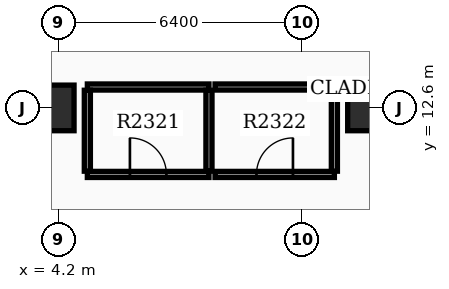
"""IFC4 building model, lengths in metres.
Left out: names, types, materials, properties, quantities, classifications, styles, units other than length and angle.
Written with IfcOpenShell. Run it as: python <this file> out.ifc"""

import sys

from ifc_helpers import new_model, si_unit, direction, frame, frame_2d, origin, origin_2d, place, context, subcontext, project, spatial, rectangle, extrude, element, fill, save


model = new_model("IFC4")
c1 = context("Model", 3, precision=1e-05, world=origin(), true_north=direction((0.0, 1.0)))
c2 = subcontext(c1, "Body", "Model", "MODEL_VIEW")
j1 = project(units=[si_unit("LENGTHUNIT", "METRE"), si_unit("PLANEANGLEUNIT", "RADIAN")], contexts=[c1])
p1 = place(None, origin())
s1 = spatial("IfcSite", under=j1, at=p1, CompositionType="ELEMENT")
p2 = place(p1, origin())
s2 = spatial("IfcBuilding", under=s1, at=p2, CompositionType="ELEMENT")
p3 = place(p2, frame((0.0, 0.0, 148.8)))
s3 = spatial("IfcBuildingStorey", under=s2, at=p3, CompositionType="ELEMENT", Elevation=148.8)
for number, where, z_axis, x_axis in (
    (1, (12.4, 12.6, 0.0), (0.0, 0.0, 1.0), (1.0, 0.0, 0.0)),
    (2, (4.0, 12.6, 0.0), (0.0, 0.0, 1.0), (1.0, 0.0, 0.0)),
):
    element("IfcColumn", number, at=place(p3, frame(where, z_axis=z_axis, x_axis=x_axis)), inside=s3, PredefinedType="COLUMN", context=c2, shape_type="SweptSolid", body=[
        extrude(rectangle(XDim=1.2, YDim=1.2, at=origin_2d()), origin(), (0.0, 0.0, 1.0), 3.9),
    ])
p4 = place(p3, frame((4.95, 10.85, 0.0), z_axis=(0.0, 0.0, 1.0), x_axis=(1.0, 0.0, 0.0)))
e3 = element("IfcWall", 3, at=p4, inside=s3, PredefinedType="PARTITIONING", context=c2, shape_type="SweptSolid", body=[
    extrude(rectangle(XDim=3.2, YDim=0.16, at=frame_2d((1.6, 0.0))), origin(), (0.0, 0.0, 1.0), 2.96),
])
p5 = place(p4, frame((1.12, 0.0, 0.0)))
e4 = element("IfcOpeningElement", 4, at=p5, cuts=e3, PredefinedType="OPENING", context=c2, shape_type="SweptSolid", body=[
    extrude(rectangle(XDim=0.96, YDim=2.15, at=frame_2d((0.48, 1.075))), frame((0.0, 0.09, 0.0), z_axis=(0.0, -1.0, 0.0), x_axis=(1.0, 0.0, 0.0)), (0.0, 0.0, 1.0), 0.18),
])
p6 = place(p3, frame((4.95, 13.15, 0.0), z_axis=(0.0, 0.0, 1.0), x_axis=(1.0, 0.0, 0.0)))
e5 = element("IfcWall", 5, at=p6, inside=s3, PredefinedType="PARTITIONING", context=c2, shape_type="SweptSolid", body=[
    extrude(rectangle(XDim=3.2, YDim=0.16, at=frame_2d((1.6, 0.0))), origin(), (0.0, 0.0, 1.0), 2.96),
])
for number, where, z_axis, x_axis in (
    (6, (4.95, 10.935, 0.0), (0.0, 0.0, 1.0), (0.0, 1.0, 0.0)),
    (7, (8.15, 10.935, 0.0), (0.0, 0.0, 1.0), (0.0, 1.0, 0.0)),
):
    element("IfcWall", number, at=place(p3, frame(where, z_axis=z_axis, x_axis=x_axis)), inside=s3, PredefinedType="PARTITIONING", context=c2, shape_type="SweptSolid", body=[
        extrude(rectangle(XDim=2.13, YDim=0.16, at=frame_2d((1.065, 0.0))), origin(), (0.0, 0.0, 1.0), 2.96),
    ])
p7 = place(p3, frame((8.31, 10.85, 0.0), z_axis=(0.0, 0.0, 1.0), x_axis=(1.0, 0.0, 0.0)))
e8 = element("IfcWall", 8, at=p7, inside=s3, PredefinedType="PARTITIONING", context=c2, shape_type="SweptSolid", body=[
    extrude(rectangle(XDim=3.14, YDim=0.16, at=frame_2d((1.57, 0.0))), origin(), (0.0, 0.0, 1.0), 2.96),
])
p8 = place(p7, frame((1.09, 0.0, 0.0)))
e9 = element("IfcOpeningElement", 9, at=p8, cuts=e8, PredefinedType="OPENING", context=c2, shape_type="SweptSolid", body=[
    extrude(rectangle(XDim=0.96, YDim=2.15, at=frame_2d((0.48, 1.075))), frame((0.0, 0.09, 0.0), z_axis=(0.0, -1.0, 0.0), x_axis=(1.0, 0.0, 0.0)), (0.0, 0.0, 1.0), 0.18),
])
p9 = place(p3, frame((8.31, 13.15, 0.0), z_axis=(0.0, 0.0, 1.0), x_axis=(1.0, 0.0, 0.0)))
e10 = element("IfcWall", 10, at=p9, inside=s3, PredefinedType="PARTITIONING", context=c2, shape_type="SweptSolid", body=[
    extrude(rectangle(XDim=3.14, YDim=0.16, at=frame_2d((1.57, 0.0))), origin(), (0.0, 0.0, 1.0), 2.96),
])
p10 = place(p3, frame((11.45, 10.935, 0.0), z_axis=(0.0, 0.0, 1.0), x_axis=(0.0, 1.0, 0.0)))
e11 = element("IfcWall", 11, at=p10, inside=s3, PredefinedType="PARTITIONING", context=c2, shape_type="SweptSolid", body=[
    extrude(rectangle(XDim=2.13, YDim=0.16, at=frame_2d((1.065, 0.0))), origin(), (0.0, 0.0, 1.0), 2.96),
])
p11 = place(p5, origin())
e12 = element("IfcDoor", 12, at=p11, inside=s3, OperationType="SINGLE_SWING_LEFT", PredefinedType="DOOR", context=c2, shape_type="SweptSolid", body=[
    extrude(rectangle(XDim=0.96, YDim=2.15, at=frame_2d((0.48, 1.075))), frame((0.0, 0.025, 0.0), z_axis=(0.0, -1.0, 0.0), x_axis=(1.0, 0.0, 0.0)), (0.0, 0.0, 1.0), 0.05),
])
fill(e4, e12)
p12 = place(p8, origin())
e13 = element("IfcDoor", 13, at=p12, inside=s3, OperationType="SINGLE_SWING_RIGHT", PredefinedType="DOOR", context=c2, shape_type="SweptSolid", body=[
    extrude(rectangle(XDim=0.96, YDim=2.15, at=frame_2d((0.48, 1.075))), frame((0.0, 0.025, 0.0), z_axis=(0.0, -1.0, 0.0), x_axis=(1.0, 0.0, 0.0)), (0.0, 0.0, 1.0), 0.05),
])
fill(e9, e13)
save(model, sys.argv[1])
